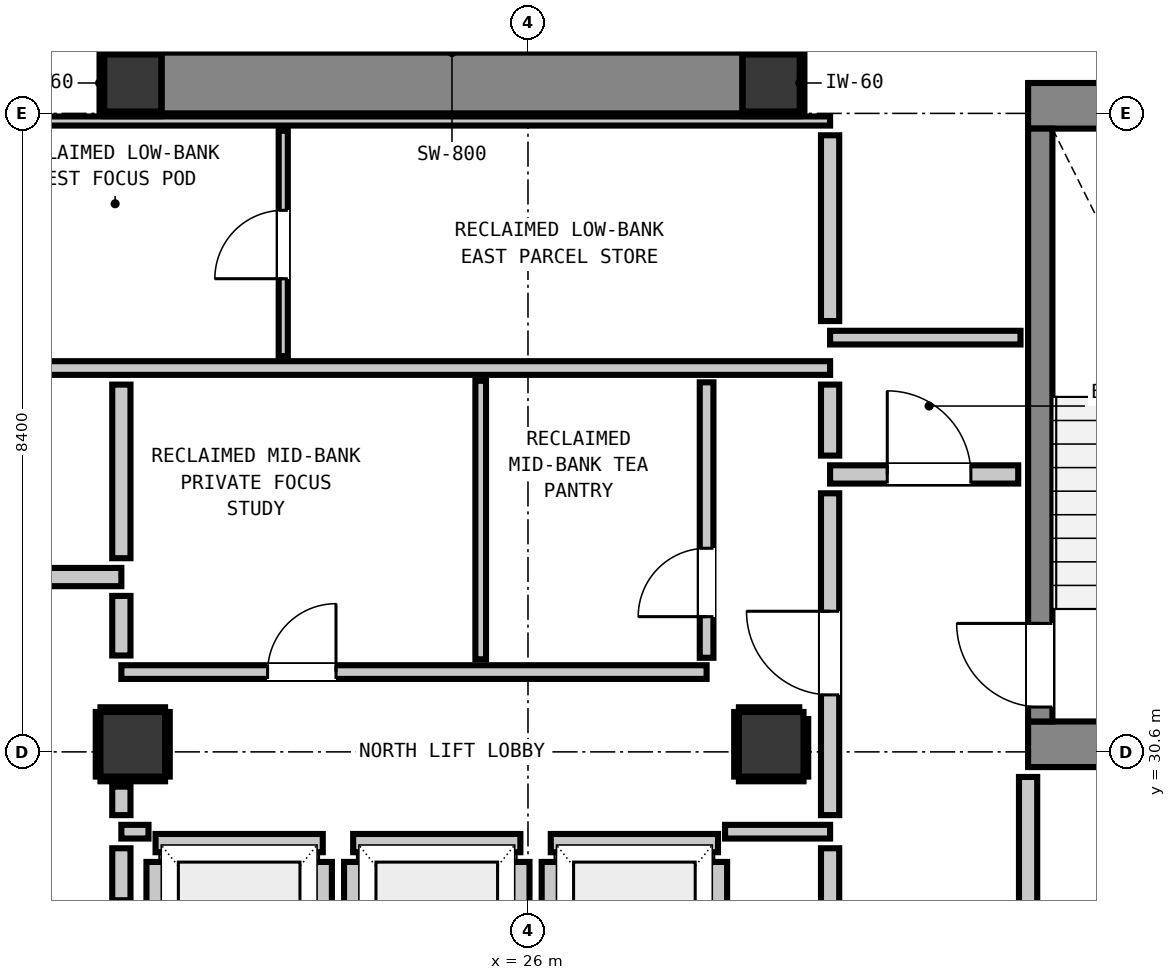
"""IFC4 building model, lengths in metres.
Left out: names, types, materials, properties, quantities, classifications, styles, units other than length and angle.
Written with IfcOpenShell. Run it as: python <this file> out.ifc"""

import sys

from ifc_helpers import new_model, si_unit, direction, frame, frame_2d, origin, origin_2d, place, context, subcontext, project, spatial, rectangle, extrude, element, fill, save


model = new_model("IFC4")
c1 = context("Model", 3, precision=1e-05, world=origin(), true_north=direction((0.0, 1.0)))
c2 = subcontext(c1, "Body", "Model", "MODEL_VIEW")
j1 = project(units=[si_unit("LENGTHUNIT", "METRE"), si_unit("PLANEANGLEUNIT", "RADIAN")], contexts=[c1])
p1 = place(None, origin())
s1 = spatial("IfcSite", under=j1, at=p1, CompositionType="ELEMENT")
p2 = place(p1, origin())
s2 = spatial("IfcBuilding", under=s1, at=p2, CompositionType="ELEMENT")
p3 = place(p2, frame((0.0, 0.0, 251.2)))
s3 = spatial("IfcBuildingStorey", under=s2, at=p3, CompositionType="ELEMENT", Elevation=251.2)
for number, where, z_axis, x_axis in (
    (1, (20.8, 39.4, 0.0), (0.0, 0.0, 1.0), (1.0, 0.0, 0.0)),
    (2, (29.2, 39.4, 0.0), (0.0, 0.0, 1.0), (1.0, 0.0, 0.0)),
):
    element("IfcColumn", number, at=place(p3, frame(where, z_axis=z_axis, x_axis=x_axis)), inside=s3, PredefinedType="COLUMN", context=c2, shape_type="SweptSolid", body=[
        extrude(rectangle(XDim=0.75, YDim=0.75, at=origin_2d()), origin(), (0.0, 0.0, 1.0), 3.32),
    ])
p4 = place(p3, frame((32.58, 39.1, 0.0), z_axis=(0.0, 0.0, 1.0), x_axis=(1.0, 0.0, 0.0)))
e3 = element("IfcWall", 3, at=p4, inside=s3, PredefinedType="SHEAR", context=c2, shape_type="SweptSolid", body=[
    extrude(rectangle(XDim=4.08, YDim=0.6, at=frame_2d((2.04, 0.0))), origin(), (0.0, 0.0, 1.0), 3.32),
])
p5 = place(p3, frame((32.58, 30.7, 0.0), z_axis=(0.0, 0.0, 1.0), x_axis=(1.0, 0.0, 0.0)))
e4 = element("IfcWall", 4, at=p5, inside=s3, PredefinedType="SHEAR", context=c2, shape_type="SweptSolid", body=[
    extrude(rectangle(XDim=3.54, YDim=0.6, at=frame_2d((1.77, 0.0))), origin(), (0.0, 0.0, 1.0), 3.32),
])
p6 = place(p3, frame((21.18, 39.4, 0.0), z_axis=(0.0, 0.0, 1.0), x_axis=(1.0, 0.0, 0.0)))
e5 = element("IfcWall", 5, at=p6, inside=s3, PredefinedType="SHEAR", context=c2, shape_type="SweptSolid", body=[
    extrude(rectangle(XDim=7.64, YDim=0.8, at=frame_2d((3.82, 0.0))), origin(), (0.0, 0.0, 1.0), 3.32),
])
p7 = place(p3, frame((32.74, 31.0, 0.0), z_axis=(0.0, 0.0, 1.0), x_axis=(0.0, 1.0, 0.0)))
e6 = element("IfcWall", 6, at=p7, inside=s3, PredefinedType="SHEAR", context=c2, shape_type="SweptSolid", body=[
    extrude(rectangle(XDim=7.8, YDim=0.32, at=frame_2d((3.9, 0.0))), origin(), (0.0, 0.0, 1.0), 3.32),
])
p8 = place(p7, frame((0.19, 0.0, 0.0)))
e7 = element("IfcOpeningElement", 7, at=p8, cuts=e6, PredefinedType="OPENING", context=c2, shape_type="SweptSolid", body=[
    extrude(rectangle(XDim=1.1, YDim=2.15, at=frame_2d((0.55, 1.075))), frame((0.0, 0.17, 0.0), z_axis=(0.0, -1.0, 0.0), x_axis=(1.0, 0.0, 0.0)), (0.0, 0.0, 1.0), 0.34),
])
for number, where, z_axis, x_axis in (
    (8, (20.8, 30.7, 0.0), (0.0, 0.0, 1.0), (1.0, 0.0, 0.0)),
    (9, (29.2, 30.7, 0.0), (0.0, 0.0, 1.0), (1.0, 0.0, 0.0)),
):
    element("IfcColumn", number, at=place(p3, frame(where, z_axis=z_axis, x_axis=x_axis)), inside=s3, PredefinedType="COLUMN", context=c2, shape_type="SweptSolid", body=[
        extrude(rectangle(XDim=0.85, YDim=0.85, at=origin_2d()), origin(), (0.0, 0.0, 1.0), 3.32),
    ])
p9 = place(p3, frame((21.1, 29.4, 0.0), z_axis=(0.0, 0.0, 1.0), x_axis=(1.0, 0.0, 0.0)))
e10 = element("IfcWall", 10, at=p9, inside=s3, PredefinedType="PARTITIONING", context=c2, shape_type="SweptSolid", body=[
    extrude(rectangle(XDim=2.2, YDim=0.24, at=frame_2d((1.1, 0.0))), origin(), (0.0, 0.0, 1.0), 3.1),
])
p10 = place(p3, frame((21.1, 27.048, 0.0), z_axis=(0.0, 0.0, 1.0), x_axis=(0.0, 1.0, 0.0)))
e11 = element("IfcWall", 11, at=p10, inside=s3, PredefinedType="PARTITIONING", context=c2, shape_type="SweptSolid", body=[
    extrude(rectangle(XDim=2.104, YDim=0.24, at=frame_2d((1.052, 0.0))), origin(), (0.0, 0.0, 1.0), 2.335),
])
p11 = place(p3, frame((23.3, 27.048, 0.0), z_axis=(0.0, 0.0, 1.0), x_axis=(0.0, 1.0, 0.0)))
e12 = element("IfcWall", 12, at=p11, inside=s3, PredefinedType="PARTITIONING", context=c2, shape_type="SweptSolid", body=[
    extrude(rectangle(XDim=2.104, YDim=0.24, at=frame_2d((1.052, 0.0))), origin(), (0.0, 0.0, 1.0), 3.1),
])
p12 = place(p3, frame((23.7, 29.4, 0.0), z_axis=(0.0, 0.0, 1.0), x_axis=(1.0, 0.0, 0.0)))
e13 = element("IfcWall", 13, at=p12, inside=s3, PredefinedType="PARTITIONING", context=c2, shape_type="SweptSolid", body=[
    extrude(rectangle(XDim=2.2, YDim=0.24, at=frame_2d((1.1, 0.0))), origin(), (0.0, 0.0, 1.0), 3.1),
])
for number, where, z_axis, x_axis in (
    (14, (23.7, 27.048, 0.0), (0.0, 0.0, 1.0), (0.0, 1.0, 0.0)),
    (15, (25.9, 27.048, 0.0), (0.0, 0.0, 1.0), (0.0, 1.0, 0.0)),
):
    element("IfcWall", number, at=place(p3, frame(where, z_axis=z_axis, x_axis=x_axis)), inside=s3, PredefinedType="PARTITIONING", context=c2, shape_type="SweptSolid", body=[
        extrude(rectangle(XDim=2.104, YDim=0.24, at=frame_2d((1.052, 0.0))), origin(), (0.0, 0.0, 1.0), 3.1),
    ])
p13 = place(p3, frame((26.3, 29.4, 0.0), z_axis=(0.0, 0.0, 1.0), x_axis=(1.0, 0.0, 0.0)))
e16 = element("IfcWall", 16, at=p13, inside=s3, PredefinedType="PARTITIONING", context=c2, shape_type="SweptSolid", body=[
    extrude(rectangle(XDim=2.2, YDim=0.24, at=frame_2d((1.1, 0.0))), origin(), (0.0, 0.0, 1.0), 3.1),
])
p14 = place(p3, frame((26.3, 27.048, 0.0), z_axis=(0.0, 0.0, 1.0), x_axis=(0.0, 1.0, 0.0)))
e17 = element("IfcWall", 17, at=p14, inside=s3, PredefinedType="PARTITIONING", context=c2, shape_type="SweptSolid", body=[
    extrude(rectangle(XDim=2.104, YDim=0.24, at=frame_2d((1.052, 0.0))), origin(), (0.0, 0.0, 1.0), 3.1),
])
p15 = place(p3, frame((28.5, 27.33, 0.0), z_axis=(0.0, 0.0, 1.0), x_axis=(0.0, 1.0, 0.0)))
e18 = element("IfcWall", 18, at=p15, inside=s3, PredefinedType="PARTITIONING", context=c2, shape_type="SweptSolid", body=[
    extrude(rectangle(XDim=1.822, YDim=0.24, at=frame_2d((0.911, 0.0))), origin(), (0.0, 0.0, 1.0), 3.1),
])
p16 = place(p3, frame((17.45, 32.9, 0.0), z_axis=(0.0, 0.0, 1.0), x_axis=(1.0, 0.0, 0.0)))
e19 = element("IfcWall", 19, at=p16, inside=s3, PredefinedType="PARTITIONING", context=c2, shape_type="SweptSolid", body=[
    extrude(rectangle(XDim=3.2, YDim=0.24, at=frame_2d((1.6, 0.0))), origin(), (0.0, 0.0, 1.0), 3.1),
])
p17 = place(p16, frame((0.159, 0.0, 0.0)))
e20 = element("IfcOpeningElement", 20, at=p17, cuts=e19, PredefinedType="OPENING", context=c2, shape_type="SweptSolid", body=[
    extrude(rectangle(XDim=1.1, YDim=2.15, at=frame_2d((0.55, 1.075))), frame((0.0, 0.13, 0.0), z_axis=(0.0, -1.0, 0.0), x_axis=(1.0, 0.0, 0.0)), (0.0, 0.0, 1.0), 0.26),
])
p18 = place(p3, frame((29.975, 34.25, 0.0), z_axis=(0.0, 0.0, 1.0), x_axis=(1.0, 0.0, 0.0)))
e21 = element("IfcWall", 21, at=p18, inside=s3, PredefinedType="PARTITIONING", context=c2, shape_type="SweptSolid", body=[
    extrude(rectangle(XDim=2.475, YDim=0.24, at=frame_2d((1.237, 0.0))), origin(), (0.0, 0.0, 1.0), 3.1),
])
p19 = place(p18, frame((0.752, 0.0, 0.0)))
e22 = element("IfcOpeningElement", 22, at=p19, cuts=e21, PredefinedType="OPENING", context=c2, shape_type="SweptSolid", body=[
    extrude(rectangle(XDim=1.1, YDim=2.15, at=frame_2d((0.55, 1.075))), frame((0.0, 0.13, 0.0), z_axis=(0.0, -1.0, 0.0), x_axis=(1.0, 0.0, 0.0)), (0.0, 0.0, 1.0), 0.26),
])
p20 = place(p3, frame((20.65, 29.55, 0.0), z_axis=(0.0, 0.0, 1.0), x_axis=(1.0, 0.0, 0.0)))
e23 = element("IfcWall", 23, at=p20, inside=s3, PredefinedType="PARTITIONING", context=c2, shape_type="SweptSolid", body=[
    extrude(rectangle(XDim=0.357, YDim=0.18, at=frame_2d((0.179, 0.0))), origin(), (0.0, 0.0, 1.0), 3.1),
])
p21 = place(p3, frame((28.593, 29.55, 0.0), z_axis=(0.0, 0.0, 1.0), x_axis=(1.0, 0.0, 0.0)))
e24 = element("IfcWall", 24, at=p21, inside=s3, PredefinedType="PARTITIONING", context=c2, shape_type="SweptSolid", body=[
    extrude(rectangle(XDim=1.382, YDim=0.18, at=frame_2d((0.691, 0.0))), origin(), (0.0, 0.0, 1.0), 3.1),
])
p22 = place(p3, frame((20.65, 31.65, 0.0), z_axis=(0.0, 0.0, 1.0), x_axis=(1.0, 0.0, 0.0)))
e25 = element("IfcWall", 25, at=p22, inside=s3, PredefinedType="PARTITIONING", context=c2, shape_type="SweptSolid", body=[
    extrude(rectangle(XDim=7.7, YDim=0.18, at=frame_2d((3.85, 0.0))), origin(), (0.0, 0.0, 1.0), 3.1),
])
p23 = place(p22, frame((1.924, 0.0, 0.0)))
e26 = element("IfcOpeningElement", 26, at=p23, cuts=e25, PredefinedType="OPENING", context=c2, shape_type="SweptSolid", body=[
    extrude(rectangle(XDim=0.9, YDim=2.1, at=frame_2d((0.45, 1.05))), frame((0.0, 0.1, 0.0), z_axis=(0.0, -1.0, 0.0), x_axis=(1.0, 0.0, 0.0)), (0.0, 0.0, 1.0), 0.2),
])
p24 = place(p3, frame((18.95, 35.65, 0.0), z_axis=(0.0, 0.0, 1.0), x_axis=(1.0, 0.0, 0.0)))
e27 = element("IfcWall", 27, at=p24, inside=s3, PredefinedType="PARTITIONING", context=c2, shape_type="SweptSolid", body=[
    extrude(rectangle(XDim=11.025, YDim=0.18, at=frame_2d((5.513, 0.0))), origin(), (0.0, 0.0, 1.0), 3.1),
])
p25 = place(p3, frame((29.975, 36.05, 0.0), z_axis=(0.0, 0.0, 1.0), x_axis=(1.0, 0.0, 0.0)))
e28 = element("IfcWall", 28, at=p25, inside=s3, PredefinedType="PARTITIONING", context=c2, shape_type="SweptSolid", body=[
    extrude(rectangle(XDim=2.505, YDim=0.18, at=frame_2d((1.252, 0.0))), origin(), (0.0, 0.0, 1.0), 3.1),
])
p26 = place(p3, frame((18.95, 38.9, 0.0), z_axis=(0.0, 0.0, 1.0), x_axis=(1.0, 0.0, 0.0)))
e29 = element("IfcWall", 29, at=p26, inside=s3, PredefinedType="PARTITIONING", context=c2, shape_type="SweptSolid", body=[
    extrude(rectangle(XDim=11.025, YDim=0.12, at=frame_2d((5.513, 0.0))), origin(), (0.0, 0.0, 1.0), 3.1),
])
p27 = place(p3, frame((20.65, 28.648, 0.0), z_axis=(0.0, 0.0, 1.0), x_axis=(0.0, 1.0, 0.0)))
e30 = element("IfcWall", 30, at=p27, inside=s3, PredefinedType="PARTITIONING", context=c2, shape_type="SweptSolid", body=[
    extrude(rectangle(XDim=0.684, YDim=0.24, at=frame_2d((0.342, 0.0))), origin(), (0.0, 0.0, 1.0), 2.335),
])
p28 = place(p3, frame((20.65, 29.768, 0.0), z_axis=(0.0, 0.0, 1.0), x_axis=(0.0, 1.0, 0.0)))
e31 = element("IfcWall", 31, at=p28, inside=s3, PredefinedType="PARTITIONING", context=c2, shape_type="SweptSolid", body=[
    extrude(rectangle(XDim=0.375, YDim=0.24, at=frame_2d((0.188, 0.0))), origin(), (0.0, 0.0, 1.0), 2.335),
])
p29 = place(p3, frame((20.65, 31.868, 0.0), z_axis=(0.0, 0.0, 1.0), x_axis=(0.0, 1.0, 0.0)))
e32 = element("IfcWall", 32, at=p29, inside=s3, PredefinedType="PARTITIONING", context=c2, shape_type="SweptSolid", body=[
    extrude(rectangle(XDim=0.784, YDim=0.24, at=frame_2d((0.392, 0.0))), origin(), (0.0, 0.0, 1.0), 2.335),
])
p30 = place(p3, frame((20.65, 33.148, 0.0), z_axis=(0.0, 0.0, 1.0), x_axis=(0.0, 1.0, 0.0)))
e33 = element("IfcWall", 33, at=p30, inside=s3, PredefinedType="PARTITIONING", context=c2, shape_type="SweptSolid", body=[
    extrude(rectangle(XDim=2.284, YDim=0.24, at=frame_2d((1.142, 0.0))), origin(), (0.0, 0.0, 1.0), 2.335),
])
p31 = place(p3, frame((29.975, 25.648, 0.0), z_axis=(0.0, 0.0, 1.0), x_axis=(0.0, 1.0, 0.0)))
e34 = element("IfcWall", 34, at=p31, inside=s3, PredefinedType="PARTITIONING", context=c2, shape_type="SweptSolid", body=[
    extrude(rectangle(XDim=3.684, YDim=0.24, at=frame_2d((1.842, 0.0))), origin(), (0.0, 0.0, 1.0), 3.1),
])
p32 = place(p3, frame((29.975, 29.768, 0.0), z_axis=(0.0, 0.0, 1.0), x_axis=(0.0, 1.0, 0.0)))
e35 = element("IfcWall", 35, at=p32, inside=s3, PredefinedType="PARTITIONING", context=c2, shape_type="SweptSolid", body=[
    extrude(rectangle(XDim=4.234, YDim=0.24, at=frame_2d((2.117, 0.0))), origin(), (0.0, 0.0, 1.0), 3.1),
])
p33 = place(p32, frame((1.582, 0.0, 0.0)))
e36 = element("IfcOpeningElement", 36, at=p33, cuts=e35, PredefinedType="OPENING", context=c2, shape_type="SweptSolid", body=[
    extrude(rectangle(XDim=1.1, YDim=2.15, at=frame_2d((0.55, 1.075))), frame((0.0, 0.13, 0.0), z_axis=(0.0, -1.0, 0.0), x_axis=(1.0, 0.0, 0.0)), (0.0, 0.0, 1.0), 0.26),
])
p34 = place(p3, frame((29.975, 34.498, 0.0), z_axis=(0.0, 0.0, 1.0), x_axis=(0.0, 1.0, 0.0)))
e37 = element("IfcWall", 37, at=p34, inside=s3, PredefinedType="PARTITIONING", context=c2, shape_type="SweptSolid", body=[
    extrude(rectangle(XDim=0.934, YDim=0.24, at=frame_2d((0.467, 0.0))), origin(), (0.0, 0.0, 1.0), 3.1),
])
p35 = place(p3, frame((29.975, 36.268, 0.0), z_axis=(0.0, 0.0, 1.0), x_axis=(0.0, 1.0, 0.0)))
e38 = element("IfcWall", 38, at=p35, inside=s3, PredefinedType="PARTITIONING", context=c2, shape_type="SweptSolid", body=[
    extrude(rectangle(XDim=2.444, YDim=0.24, at=frame_2d((1.222, 0.0))), origin(), (0.0, 0.0, 1.0), 3.1),
])
p36 = place(p3, frame((32.58, 25.648, 0.0), z_axis=(0.0, 0.0, 1.0), x_axis=(0.0, 1.0, 0.0)))
e39 = element("IfcWall", 39, at=p36, inside=s3, PredefinedType="PARTITIONING", context=c2, shape_type="SweptSolid", body=[
    extrude(rectangle(XDim=4.622, YDim=0.24, at=frame_2d((2.311, 0.0))), origin(), (0.0, 0.0, 1.0), 3.1),
])
p37 = place(p3, frame((28.35, 31.838, 0.0), z_axis=(0.0, 0.0, 1.0), x_axis=(0.0, 1.0, 0.0)))
e40 = element("IfcWall", 40, at=p37, inside=s3, PredefinedType="PARTITIONING", context=c2, shape_type="SweptSolid", body=[
    extrude(rectangle(XDim=3.624, YDim=0.18, at=frame_2d((1.812, 0.0))), origin(), (0.0, 0.0, 1.0), 3.1),
])
p38 = place(p37, frame((0.541, 0.0, 0.0)))
e41 = element("IfcOpeningElement", 41, at=p38, cuts=e40, PredefinedType="OPENING", context=c2, shape_type="SweptSolid", body=[
    extrude(rectangle(XDim=0.9, YDim=2.1, at=frame_2d((0.45, 1.05))), frame((0.0, 0.1, 0.0), z_axis=(0.0, -1.0, 0.0), x_axis=(1.0, 0.0, 0.0)), (0.0, 0.0, 1.0), 0.2),
])
p39 = place(p3, frame((25.378, 31.818, 0.0), z_axis=(0.0, 0.0, 1.0), x_axis=(0.0, 1.0, 0.0)))
e42 = element("IfcWall", 42, at=p39, inside=s3, PredefinedType="PARTITIONING", context=c2, shape_type="SweptSolid", body=[
    extrude(rectangle(XDim=3.664, YDim=0.14, at=frame_2d((1.832, 0.0))), origin(), (0.0, 0.0, 1.0), 3.1),
])
p40 = place(p3, frame((22.78, 35.808, 0.0), z_axis=(0.0, 0.0, 1.0), x_axis=(0.0, 1.0, 0.0)))
e43 = element("IfcWall", 43, at=p40, inside=s3, PredefinedType="PARTITIONING", context=c2, shape_type="SweptSolid", body=[
    extrude(rectangle(XDim=2.964, YDim=0.12, at=frame_2d((1.482, 0.0))), origin(), (0.0, 0.0, 1.0), 3.1),
])
p41 = place(p40, frame((1.017, 0.0, 0.0)))
e44 = element("IfcOpeningElement", 44, at=p41, cuts=e43, PredefinedType="OPENING", context=c2, shape_type="SweptSolid", body=[
    extrude(rectangle(XDim=0.9, YDim=2.1, at=frame_2d((0.45, 1.05))), frame((0.0, 0.07, 0.0), z_axis=(0.0, -1.0, 0.0), x_axis=(1.0, 0.0, 0.0)), (0.0, 0.0, 1.0), 0.14),
])
for number, where, z_axis, x_axis in (
    (45, (20.425, 38.993, 0.0), (0.0, 0.0, 1.0), (1.0, 0.0, 0.0)),
    (46, (20.425, 39.807, 0.0), (0.0, 0.0, 1.0), (1.0, 0.0, 0.0)),
):
    element("IfcWall", number, at=place(p3, frame(where, z_axis=z_axis, x_axis=x_axis)), inside=s3, PredefinedType="PARTITIONING", context=c2, shape_type="SweptSolid", body=[
        extrude(rectangle(XDim=0.742, YDim=0.06, at=frame_2d((0.371, 0.0))), origin(), (0.0, 0.0, 1.0), 1.45),
    ])
p42 = place(p3, frame((20.393, 39.025, 0.0), z_axis=(0.0, 0.0, 1.0), x_axis=(0.0, 1.0, 0.0)))
e47 = element("IfcWall", 47, at=p42, inside=s3, PredefinedType="PARTITIONING", context=c2, shape_type="SweptSolid", body=[
    extrude(rectangle(XDim=0.75, YDim=0.06, at=frame_2d((0.375, 0.0))), origin(), (0.0, 0.0, 1.0), 1.45),
])
for number, where, z_axis, x_axis in (
    (48, (28.833, 38.993, 0.0), (0.0, 0.0, 1.0), (1.0, 0.0, 0.0)),
    (49, (28.833, 39.807, 0.0), (0.0, 0.0, 1.0), (1.0, 0.0, 0.0)),
):
    element("IfcWall", number, at=place(p3, frame(where, z_axis=z_axis, x_axis=x_axis)), inside=s3, PredefinedType="PARTITIONING", context=c2, shape_type="SweptSolid", body=[
        extrude(rectangle(XDim=0.742, YDim=0.06, at=frame_2d((0.371, 0.0))), origin(), (0.0, 0.0, 1.0), 1.45),
    ])
p43 = place(p3, frame((29.607, 39.025, 0.0), z_axis=(0.0, 0.0, 1.0), x_axis=(0.0, 1.0, 0.0)))
e50 = element("IfcWall", 50, at=p43, inside=s3, PredefinedType="PARTITIONING", context=c2, shape_type="SweptSolid", body=[
    extrude(rectangle(XDim=0.75, YDim=0.06, at=frame_2d((0.375, 0.0))), origin(), (0.0, 0.0, 1.0), 1.45),
])
for number, where, z_axis, x_axis in (
    (51, (20.375, 30.243, 0.0), (0.0, 0.0, 1.0), (1.0, 0.0, 0.0)),
    (52, (20.375, 31.157, 0.0), (0.0, 0.0, 1.0), (1.0, 0.0, 0.0)),
    (53, (20.343, 30.275, 0.0), (0.0, 0.0, 1.0), (0.0, 1.0, 0.0)),
    (54, (21.257, 30.275, 0.0), (0.0, 0.0, 1.0), (0.0, 1.0, 0.0)),
    (55, (28.775, 30.243, 0.0), (0.0, 0.0, 1.0), (1.0, 0.0, 0.0)),
):
    element("IfcWall", number, at=place(p3, frame(where, z_axis=z_axis, x_axis=x_axis)), inside=s3, PredefinedType="PARTITIONING", context=c2, shape_type="SweptSolid", body=[
        extrude(rectangle(XDim=0.85, YDim=0.06, at=frame_2d((0.425, 0.0))), origin(), (0.0, 0.0, 1.0), 1.45),
    ])
p44 = place(p3, frame((28.775, 31.157, 0.0), z_axis=(0.0, 0.0, 1.0), x_axis=(1.0, 0.0, 0.0)))
e56 = element("IfcWall", 56, at=p44, inside=s3, PredefinedType="PARTITIONING", context=c2, shape_type="SweptSolid", body=[
    extrude(rectangle(XDim=0.794, YDim=0.06, at=frame_2d((0.397, 0.0))), origin(), (0.0, 0.0, 1.0), 1.45),
])
p45 = place(p3, frame((28.743, 30.275, 0.0), z_axis=(0.0, 0.0, 1.0), x_axis=(0.0, 1.0, 0.0)))
e57 = element("IfcWall", 57, at=p45, inside=s3, PredefinedType="PARTITIONING", context=c2, shape_type="SweptSolid", body=[
    extrude(rectangle(XDim=0.85, YDim=0.06, at=frame_2d((0.425, 0.0))), origin(), (0.0, 0.0, 1.0), 1.45),
])
p46 = place(p3, frame((29.657, 30.275, 0.0), z_axis=(0.0, 0.0, 1.0), x_axis=(0.0, 1.0, 0.0)))
e58 = element("IfcWall", 58, at=p46, inside=s3, PredefinedType="PARTITIONING", context=c2, shape_type="SweptSolid", body=[
    extrude(rectangle(XDim=0.757, YDim=0.06, at=frame_2d((0.378, 0.0))), origin(), (0.0, 0.0, 1.0), 1.45),
])
p47 = place(p8, origin())
e59 = element("IfcDoor", 59, at=p47, inside=s3, OperationType="SINGLE_SWING_RIGHT", PredefinedType="DOOR", context=c2, shape_type="SweptSolid", body=[
    extrude(rectangle(XDim=1.1, YDim=2.15, at=frame_2d((0.55, 1.075))), frame((0.0, 0.025, 0.0), z_axis=(0.0, -1.0, 0.0), x_axis=(1.0, 0.0, 0.0)), (0.0, 0.0, 1.0), 0.05),
])
fill(e7, e59)
p48 = place(p33, origin())
e60 = element("IfcDoor", 60, at=p48, inside=s3, OperationType="SINGLE_SWING_RIGHT", PredefinedType="DOOR", context=c2, shape_type="SweptSolid", body=[
    extrude(rectangle(XDim=1.1, YDim=2.15, at=frame_2d((0.55, 1.075))), frame((0.0, 0.025, 0.0), z_axis=(0.0, -1.0, 0.0), x_axis=(1.0, 0.0, 0.0)), (0.0, 0.0, 1.0), 0.05),
])
fill(e36, e60)
p49 = place(p19, origin())
e61 = element("IfcDoor", 61, at=p49, inside=s3, OperationType="SINGLE_SWING_LEFT", PredefinedType="DOOR", context=c2, shape_type="SweptSolid", body=[
    extrude(rectangle(XDim=1.1, YDim=2.15, at=frame_2d((0.55, 1.075))), frame((0.0, 0.025, 0.0), z_axis=(0.0, -1.0, 0.0), x_axis=(1.0, 0.0, 0.0)), (0.0, 0.0, 1.0), 0.05),
])
fill(e22, e61)
p50 = place(p41, origin())
e62 = element("IfcDoor", 62, at=p50, inside=s3, OperationType="SINGLE_SWING_LEFT", PredefinedType="DOOR", context=c2, shape_type="SweptSolid", body=[
    extrude(rectangle(XDim=0.9, YDim=2.1, at=frame_2d((0.45, 1.05))), frame((0.0, 0.025, 0.0), z_axis=(0.0, -1.0, 0.0), x_axis=(1.0, 0.0, 0.0)), (0.0, 0.0, 1.0), 0.05),
])
fill(e44, e62)
p51 = place(p23, origin())
e63 = element("IfcDoor", 63, at=p51, inside=s3, OperationType="SINGLE_SWING_RIGHT", PredefinedType="DOOR", context=c2, shape_type="SweptSolid", body=[
    extrude(rectangle(XDim=0.9, YDim=2.1, at=frame_2d((0.45, 1.05))), frame((0.0, 0.025, 0.0), z_axis=(0.0, -1.0, 0.0), x_axis=(1.0, 0.0, 0.0)), (0.0, 0.0, 1.0), 0.05),
])
fill(e26, e63)
p52 = place(p38, origin())
e64 = element("IfcDoor", 64, at=p52, inside=s3, OperationType="SINGLE_SWING_LEFT", PredefinedType="DOOR", context=c2, shape_type="SweptSolid", body=[
    extrude(rectangle(XDim=0.9, YDim=2.1, at=frame_2d((0.45, 1.05))), frame((0.0, 0.025, 0.0), z_axis=(0.0, -1.0, 0.0), x_axis=(1.0, 0.0, 0.0)), (0.0, 0.0, 1.0), 0.05),
])
fill(e41, e64)
save(model, sys.argv[1])
